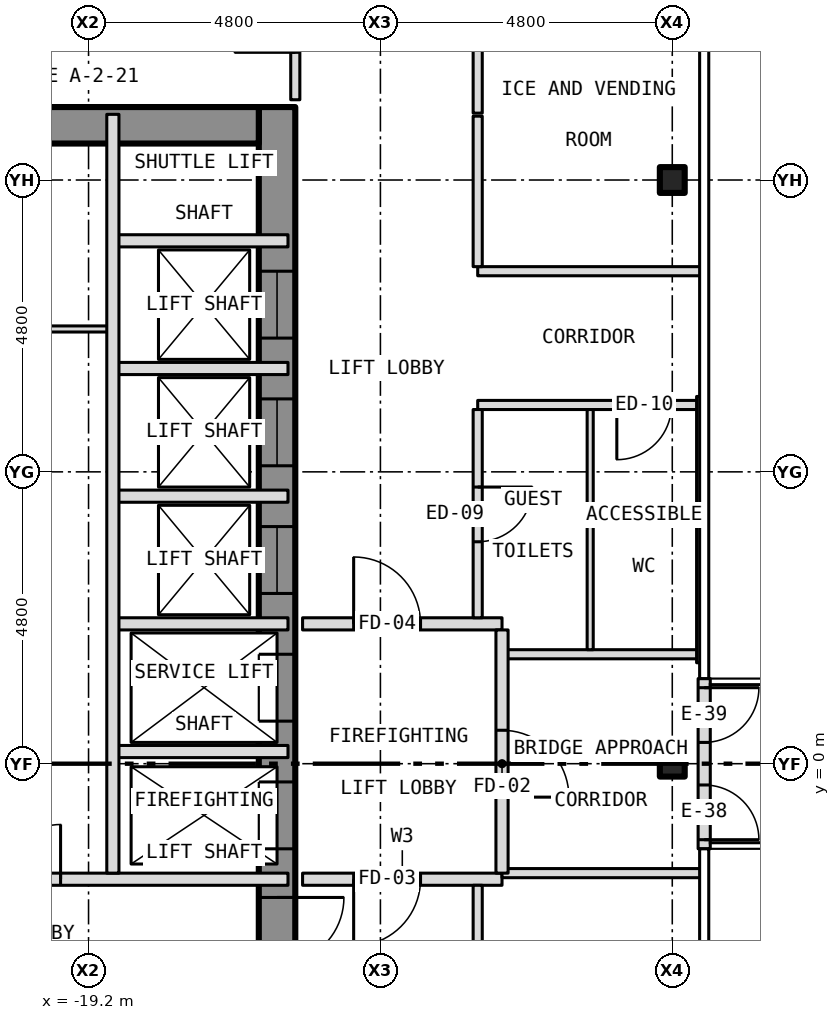
"""IFC4 building model, lengths in metres.
Left out: names, types, materials, properties, quantities, classifications, styles, units other than length and angle.
Written with IfcOpenShell. Run it as: python <this file> out.ifc"""

import sys

from ifc_helpers import new_model, si_unit, direction, frame, frame_2d, origin, origin_2d, place, context, subcontext, project, spatial, rectangle, i_section, extrude, element, fill, save


model = new_model("IFC4")
c1 = context("Model", 3, precision=1e-05, world=origin(), true_north=direction((0.0, 1.0)))
c2 = subcontext(c1, "Body", "Model", "MODEL_VIEW")
j1 = project(units=[si_unit("LENGTHUNIT", "METRE"), si_unit("PLANEANGLEUNIT", "RADIAN")], contexts=[c1])
p1 = place(None, origin())
s1 = spatial("IfcSite", under=j1, at=p1, CompositionType="ELEMENT")
p2 = place(p1, origin())
s2 = spatial("IfcBuilding", under=s1, at=p2, CompositionType="ELEMENT")
p3 = place(p2, frame((0.0, 0.0, 77.5)))
s3 = spatial("IfcBuildingStorey", under=s2, at=p3, CompositionType="ELEMENT", Elevation=77.5)
for number, where, z_axis, x_axis in (
    (1, (-9.6, 0.0, -0.15), (0.0, 0.0, 1.0), (1.0, 0.0, 0.0)),
    (2, (-9.6, 9.6, -0.15), (0.0, 0.0, 1.0), (1.0, 0.0, 0.0)),
):
    element("IfcColumn", number, at=place(p3, frame(where, z_axis=z_axis, x_axis=x_axis)), inside=s3, PredefinedType="COLUMN", context=c2, shape_type="SweptSolid", body=[
        extrude(i_section(OverallWidth=0.409, OverallDepth=0.424, WebThickness=0.033, FlangeThickness=0.052, at=origin_2d()), origin(), (0.0, 0.0, 1.0), 3.5),
    ])
p4 = place(p3, frame((-16.1, -10.8, 0.0), z_axis=(0.0, 0.0, 1.0), x_axis=(0.0, 1.0, 0.0)))
e3 = element("IfcWall", 3, at=p4, inside=s3, PredefinedType="SHEAR", context=c2, shape_type="SweptSolid", body=[
    extrude(rectangle(XDim=21.6, YDim=0.6, at=frame_2d((10.8, 0.0))), origin(), (0.0, 0.0, 1.0), 3.25),
])
p5 = place(p4, frame((9.4, 0.0, 0.0)))
e4 = element("IfcOpeningElement", 4, at=p5, cuts=e3, PredefinedType="OPENING", context=c2, shape_type="SweptSolid", body=[
    extrude(rectangle(XDim=1.1, YDim=2.1, at=frame_2d((0.55, 1.05))), frame((0.0, 0.312, 0.0), z_axis=(0.0, -1.0, 0.0), x_axis=(1.0, 0.0, 0.0)), (0.0, 0.0, 1.0), 0.624),
])
p6 = place(p4, frame((11.5, 0.0, 0.0)))
e5 = element("IfcOpeningElement", 5, at=p6, cuts=e3, PredefinedType="OPENING", context=c2, shape_type="SweptSolid", body=[
    extrude(rectangle(XDim=1.1, YDim=2.1, at=frame_2d((0.55, 1.05))), frame((0.0, 0.312, 0.0), z_axis=(0.0, -1.0, 0.0), x_axis=(1.0, 0.0, 0.0)), (0.0, 0.0, 1.0), 0.624),
])
p7 = place(p4, frame((13.6, 0.0, 0.0)))
e6 = element("IfcOpeningElement", 6, at=p7, cuts=e3, PredefinedType="OPENING", context=c2, shape_type="SweptSolid", body=[
    extrude(rectangle(XDim=1.1, YDim=2.1, at=frame_2d((0.55, 1.05))), frame((0.0, 0.312, 0.0), z_axis=(0.0, -1.0, 0.0), x_axis=(1.0, 0.0, 0.0)), (0.0, 0.0, 1.0), 0.624),
])
p8 = place(p4, frame((15.7, 0.0, 0.0)))
e7 = element("IfcOpeningElement", 7, at=p8, cuts=e3, PredefinedType="OPENING", context=c2, shape_type="SweptSolid", body=[
    extrude(rectangle(XDim=1.1, YDim=2.1, at=frame_2d((0.55, 1.05))), frame((0.0, 0.312, 0.0), z_axis=(0.0, -1.0, 0.0), x_axis=(1.0, 0.0, 0.0)), (0.0, 0.0, 1.0), 0.624),
])
p9 = place(p4, frame((17.8, 0.0, 0.0)))
e8 = element("IfcOpeningElement", 8, at=p9, cuts=e3, PredefinedType="OPENING", context=c2, shape_type="SweptSolid", body=[
    extrude(rectangle(XDim=1.1, YDim=2.1, at=frame_2d((0.55, 1.05))), frame((0.0, 0.312, 0.0), z_axis=(0.0, -1.0, 0.0), x_axis=(1.0, 0.0, 0.0)), (0.0, 0.0, 1.0), 0.624),
])
p10 = place(p4, frame((0.758, 0.0, 0.0)))
e9 = element("IfcOpeningElement", 9, at=p10, cuts=e3, PredefinedType="OPENING", context=c2, shape_type="SweptSolid", body=[
    extrude(rectangle(XDim=1.1, YDim=2.1, at=frame_2d((0.55, 1.05))), frame((0.0, 0.312, 0.0), z_axis=(0.0, -1.0, 0.0), x_axis=(1.0, 0.0, 0.0)), (0.0, 0.0, 1.0), 0.624),
])
p11 = place(p4, frame((7.5, 0.0, 0.0)))
e10 = element("IfcOpeningElement", 10, at=p11, cuts=e3, PredefinedType="OPENING", context=c2, shape_type="SweptSolid", body=[
    extrude(rectangle(XDim=1.1, YDim=2.1, at=frame_2d((0.55, 1.05))), frame((0.0, 0.312, 0.0), z_axis=(0.0, -1.0, 0.0), x_axis=(1.0, 0.0, 0.0)), (0.0, 0.0, 1.0), 0.624),
])
p12 = place(p3, frame((-23.4, 10.5, 0.0), z_axis=(0.0, 0.0, 1.0), x_axis=(1.0, 0.0, 0.0)))
e11 = element("IfcWall", 11, at=p12, inside=s3, PredefinedType="SHEAR", context=c2, shape_type="SweptSolid", body=[
    extrude(rectangle(XDim=7.0, YDim=0.6, at=frame_2d((3.5, 0.0))), origin(), (0.0, 0.0, 1.0), 3.25),
])
p13 = place(p3, frame((-9.075, -1.4, 0.0), z_axis=(0.0, 0.0, 1.0), x_axis=(0.0, 1.0, 0.0)))
e12 = element("IfcWall", 12, at=p13, inside=s3, PredefinedType="SOLIDWALL", context=c2, shape_type="SweptSolid", body=[
    extrude(rectangle(XDim=2.8, YDim=0.2, at=frame_2d((1.4, 0.0))), origin(), (0.0, 0.0, 1.0), 3.5),
])
p14 = place(p13, frame((0.15, 0.0, 0.0)))
e13 = element("IfcOpeningElement", 13, at=p14, cuts=e12, PredefinedType="OPENING", context=c2, shape_type="SweptSolid", body=[
    extrude(rectangle(XDim=0.9, YDim=2.1, at=frame_2d((0.45, 1.05))), frame((0.0, 0.112, 0.0), z_axis=(0.0, -1.0, 0.0), x_axis=(1.0, 0.0, 0.0)), (0.0, 0.0, 1.0), 0.224),
])
p15 = place(p13, frame((1.75, 0.0, 0.0)))
e14 = element("IfcOpeningElement", 14, at=p15, cuts=e12, PredefinedType="OPENING", context=c2, shape_type="SweptSolid", body=[
    extrude(rectangle(XDim=0.9, YDim=2.1, at=frame_2d((0.45, 1.05))), frame((0.0, 0.112, 0.0), z_axis=(0.0, -1.0, 0.0), x_axis=(1.0, 0.0, 0.0)), (0.0, 0.0, 1.0), 0.224),
])
p16 = place(p3, frame((-23.88, -1.9, 0.0), z_axis=(0.0, 0.0, 1.0), x_axis=(1.0, 0.0, 0.0)))
e15 = element("IfcWall", 15, at=p16, inside=s3, PredefinedType="PARTITIONING", context=c2, shape_type="SweptSolid", body=[
    extrude(rectangle(XDim=7.96, YDim=0.2, at=frame_2d((3.98, 0.0))), origin(), (0.0, 0.0, 1.0), 3.25),
])
p17 = place(p16, frame((3.32, 0.0, 0.0)))
e16 = element("IfcOpeningElement", 16, at=p17, cuts=e15, PredefinedType="OPENING", context=c2, shape_type="SweptSolid", body=[
    extrude(rectangle(XDim=0.9, YDim=2.1, at=frame_2d((0.45, 1.05))), frame((0.0, 0.112, 0.0), z_axis=(0.0, -1.0, 0.0), x_axis=(1.0, 0.0, 0.0)), (0.0, 0.0, 1.0), 0.224),
])
p18 = place(p3, frame((-15.68, -1.9, 0.0), z_axis=(0.0, 0.0, 1.0), x_axis=(1.0, 0.0, 0.0)))
e17 = element("IfcWall", 17, at=p18, inside=s3, PredefinedType="PARTITIONING", context=c2, shape_type="SweptSolid", body=[
    extrude(rectangle(XDim=3.28, YDim=0.2, at=frame_2d((1.64, 0.0))), origin(), (0.0, 0.0, 1.0), 3.35),
])
p19 = place(p18, frame((0.84, 0.0, 0.0)))
e18 = element("IfcOpeningElement", 18, at=p19, cuts=e17, PredefinedType="OPENING", context=c2, shape_type="SweptSolid", body=[
    extrude(rectangle(XDim=1.1, YDim=2.1, at=frame_2d((0.55, 1.05))), frame((0.0, 0.112, 0.0), z_axis=(0.0, -1.0, 0.0), x_axis=(1.0, 0.0, 0.0)), (0.0, 0.0, 1.0), 0.224),
])
p20 = place(p3, frame((-12.4, -1.8, 0.0), z_axis=(0.0, 0.0, 1.0), x_axis=(1.0, 0.0, 0.0)))
e19 = element("IfcWall", 19, at=p20, inside=s3, PredefinedType="PARTITIONING", context=c2, shape_type="SweptSolid", body=[
    extrude(rectangle(XDim=3.28, YDim=0.15, at=frame_2d((1.64, 0.0))), origin(), (0.0, 0.0, 1.0), 3.35),
])
p21 = place(p3, frame((-18.8, 0.2, 0.0), z_axis=(0.0, 0.0, 1.0), x_axis=(1.0, 0.0, 0.0)))
e20 = element("IfcWall", 20, at=p21, inside=s3, PredefinedType="PARTITIONING", context=c2, shape_type="SweptSolid", body=[
    extrude(rectangle(XDim=2.88, YDim=0.2, at=frame_2d((1.44, 0.0))), origin(), (0.0, 0.0, 1.0), 3.25),
])
p22 = place(p3, frame((-12.4, 1.8, 0.0), z_axis=(0.0, 0.0, 1.0), x_axis=(1.0, 0.0, 0.0)))
e21 = element("IfcWall", 21, at=p22, inside=s3, PredefinedType="PARTITIONING", context=c2, shape_type="SweptSolid", body=[
    extrude(rectangle(XDim=3.25, YDim=0.15, at=frame_2d((1.625, 0.0))), origin(), (0.0, 0.0, 1.0), 3.35),
])
p23 = place(p3, frame((-18.8, 2.3, 0.0), z_axis=(0.0, 0.0, 1.0), x_axis=(1.0, 0.0, 0.0)))
e22 = element("IfcWall", 22, at=p23, inside=s3, PredefinedType="PARTITIONING", context=c2, shape_type="SweptSolid", body=[
    extrude(rectangle(XDim=2.88, YDim=0.2, at=frame_2d((1.44, 0.0))), origin(), (0.0, 0.0, 1.0), 3.25),
])
p24 = place(p3, frame((-15.68, 2.3, 0.0), z_axis=(0.0, 0.0, 1.0), x_axis=(1.0, 0.0, 0.0)))
e23 = element("IfcWall", 23, at=p24, inside=s3, PredefinedType="PARTITIONING", context=c2, shape_type="SweptSolid", body=[
    extrude(rectangle(XDim=3.28, YDim=0.2, at=frame_2d((1.64, 0.0))), origin(), (0.0, 0.0, 1.0), 3.35),
])
p25 = place(p24, frame((0.84, 0.0, 0.0)))
e24 = element("IfcOpeningElement", 24, at=p25, cuts=e23, PredefinedType="OPENING", context=c2, shape_type="SweptSolid", body=[
    extrude(rectangle(XDim=1.1, YDim=2.1, at=frame_2d((0.55, 1.05))), frame((0.0, 0.112, 0.0), z_axis=(0.0, -1.0, 0.0), x_axis=(1.0, 0.0, 0.0)), (0.0, 0.0, 1.0), 0.224),
])
p26 = place(p3, frame((-18.8, 4.4, 0.0), z_axis=(0.0, 0.0, 1.0), x_axis=(1.0, 0.0, 0.0)))
e25 = element("IfcWall", 25, at=p26, inside=s3, PredefinedType="PARTITIONING", context=c2, shape_type="SweptSolid", body=[
    extrude(rectangle(XDim=2.88, YDim=0.2, at=frame_2d((1.44, 0.0))), origin(), (0.0, 0.0, 1.0), 3.25),
])
p27 = place(p3, frame((-12.8, 5.9, 0.0), z_axis=(0.0, 0.0, 1.0), x_axis=(1.0, 0.0, 0.0)))
e26 = element("IfcWall", 26, at=p27, inside=s3, PredefinedType="PARTITIONING", context=c2, shape_type="SweptSolid", body=[
    extrude(rectangle(XDim=3.65, YDim=0.15, at=frame_2d((1.825, 0.0))), origin(), (0.0, 0.0, 1.0), 3.35),
])
p28 = place(p27, frame((2.288, 0.0, 0.0)))
e27 = element("IfcOpeningElement", 27, at=p28, cuts=e26, PredefinedType="OPENING", context=c2, shape_type="SweptSolid", body=[
    extrude(rectangle(XDim=0.9, YDim=2.1, at=frame_2d((0.45, 1.05))), frame((0.0, 0.087, 0.0), z_axis=(0.0, -1.0, 0.0), x_axis=(1.0, 0.0, 0.0)), (0.0, 0.0, 1.0), 0.174),
])
p29 = place(p3, frame((-18.8, 6.5, 0.0), z_axis=(0.0, 0.0, 1.0), x_axis=(1.0, 0.0, 0.0)))
e28 = element("IfcWall", 28, at=p29, inside=s3, PredefinedType="PARTITIONING", context=c2, shape_type="SweptSolid", body=[
    extrude(rectangle(XDim=2.88, YDim=0.2, at=frame_2d((1.44, 0.0))), origin(), (0.0, 0.0, 1.0), 3.25),
])
p30 = place(p3, frame((-23.88, 7.15, 0.0), z_axis=(0.0, 0.0, 1.0), x_axis=(1.0, 0.0, 0.0)))
e29 = element("IfcWall", 29, at=p30, inside=s3, PredefinedType="PARTITIONING", context=c2, shape_type="SweptSolid", body=[
    extrude(rectangle(XDim=5.08, YDim=0.1, at=frame_2d((2.54, 0.0))), origin(), (0.0, 0.0, 1.0), 3.25),
])
p31 = place(p30, frame((2.03, 0.0, 0.0)))
e30 = element("IfcOpeningElement", 30, at=p31, cuts=e29, PredefinedType="OPENING", context=c2, shape_type="SweptSolid", body=[
    extrude(rectangle(XDim=0.9, YDim=2.1, at=frame_2d((0.45, 1.05))), frame((0.0, 0.062, 0.0), z_axis=(0.0, -1.0, 0.0), x_axis=(1.0, 0.0, 0.0)), (0.0, 0.0, 1.0), 0.124),
])
p32 = place(p3, frame((-12.8, 8.1, 0.0), z_axis=(0.0, 0.0, 1.0), x_axis=(1.0, 0.0, 0.0)))
e31 = element("IfcWall", 31, at=p32, inside=s3, PredefinedType="PARTITIONING", context=c2, shape_type="SweptSolid", body=[
    extrude(rectangle(XDim=3.68, YDim=0.15, at=frame_2d((1.84, 0.0))), origin(), (0.0, 0.0, 1.0), 3.35),
])
p33 = place(p3, frame((-18.8, 8.6, 0.0), z_axis=(0.0, 0.0, 1.0), x_axis=(1.0, 0.0, 0.0)))
e32 = element("IfcWall", 32, at=p33, inside=s3, PredefinedType="PARTITIONING", context=c2, shape_type="SweptSolid", body=[
    extrude(rectangle(XDim=2.88, YDim=0.2, at=frame_2d((1.44, 0.0))), origin(), (0.0, 0.0, 1.0), 3.25),
])
p34 = place(p3, frame((-18.8, -1.8, 0.0), z_axis=(0.0, 0.0, 1.0), x_axis=(0.0, 1.0, 0.0)))
e33 = element("IfcWall", 33, at=p34, inside=s3, PredefinedType="PARTITIONING", context=c2, shape_type="SweptSolid", body=[
    extrude(rectangle(XDim=12.48, YDim=0.2, at=frame_2d((6.24, 0.0))), origin(), (0.0, 0.0, 1.0), 3.25),
])
p35 = place(p3, frame((-15.8, 10.92, 0.0), z_axis=(0.0, 0.0, 1.0), x_axis=(0.0, 1.0, 0.0)))
e34 = element("IfcWall", 34, at=p35, inside=s3, PredefinedType="PARTITIONING", context=c2, shape_type="SweptSolid", body=[
    extrude(rectangle(XDim=4.805, YDim=0.15, at=frame_2d((2.403, 0.0))), origin(), (0.0, 0.0, 1.0), 3.35),
])
p36 = place(p35, frame((0.78, 0.0, 0.0)))
e35 = element("IfcOpeningElement", 35, at=p36, cuts=e34, PredefinedType="OPENING", context=c2, shape_type="SweptSolid", body=[
    extrude(rectangle(XDim=1.0, YDim=2.1, at=frame_2d((0.5, 1.05))), frame((0.0, 0.087, 0.0), z_axis=(0.0, -1.0, 0.0), x_axis=(1.0, 0.0, 0.0)), (0.0, 0.0, 1.0), 0.174),
])
p37 = place(p3, frame((-12.8, -13.525, 0.0), z_axis=(0.0, 0.0, 1.0), x_axis=(0.0, 1.0, 0.0)))
e36 = element("IfcWall", 36, at=p37, inside=s3, PredefinedType="PARTITIONING", context=c2, shape_type="SweptSolid", body=[
    extrude(rectangle(XDim=11.525, YDim=0.15, at=frame_2d((5.762, 0.0))), origin(), (0.0, 0.0, 1.0), 3.35),
])
p38 = place(p37, frame((6.725, 0.0, 0.0)))
e37 = element("IfcOpeningElement", 37, at=p38, cuts=e36, PredefinedType="OPENING", context=c2, shape_type="SweptSolid", body=[
    extrude(rectangle(XDim=0.9, YDim=2.1, at=frame_2d((0.45, 1.05))), frame((0.0, 0.087, 0.0), z_axis=(0.0, -1.0, 0.0), x_axis=(1.0, 0.0, 0.0)), (0.0, 0.0, 1.0), 0.174),
])
p39 = place(p3, frame((-12.8, 2.4, 0.0), z_axis=(0.0, 0.0, 1.0), x_axis=(0.0, 1.0, 0.0)))
e38 = element("IfcWall", 38, at=p39, inside=s3, PredefinedType="PARTITIONING", context=c2, shape_type="SweptSolid", body=[
    extrude(rectangle(XDim=3.425, YDim=0.15, at=frame_2d((1.712, 0.0))), origin(), (0.0, 0.0, 1.0), 3.35),
])
p40 = place(p39, frame((1.25, 0.0, 0.0)))
e39 = element("IfcOpeningElement", 39, at=p40, cuts=e38, PredefinedType="OPENING", context=c2, shape_type="SweptSolid", body=[
    extrude(rectangle(XDim=0.9, YDim=2.1, at=frame_2d((0.45, 1.05))), frame((0.0, 0.087, 0.0), z_axis=(0.0, -1.0, 0.0), x_axis=(1.0, 0.0, 0.0)), (0.0, 0.0, 1.0), 0.174),
])
p41 = place(p3, frame((-12.8, 8.175, 0.0), z_axis=(0.0, 0.0, 1.0), x_axis=(0.0, 1.0, 0.0)))
e40 = element("IfcWall", 40, at=p41, inside=s3, PredefinedType="PARTITIONING", context=c2, shape_type="SweptSolid", body=[
    extrude(rectangle(XDim=2.475, YDim=0.15, at=frame_2d((1.237, 0.0))), origin(), (0.0, 0.0, 1.0), 3.35),
])
p42 = place(p3, frame((-12.8, 10.7, 0.0), z_axis=(0.0, 0.0, 1.0), x_axis=(0.0, 1.0, 0.0)))
e41 = element("IfcWall", 41, at=p42, inside=s3, PredefinedType="PARTITIONING", context=c2, shape_type="SweptSolid", body=[
    extrude(rectangle(XDim=2.825, YDim=0.15, at=frame_2d((1.413, 0.0))), origin(), (0.0, 0.0, 1.0), 3.35),
])
p43 = place(p3, frame((-12.4, -1.8, 0.0), z_axis=(0.0, 0.0, 1.0), x_axis=(0.0, 1.0, 0.0)))
e42 = element("IfcWall", 42, at=p43, inside=s3, PredefinedType="PARTITIONING", context=c2, shape_type="SweptSolid", body=[
    extrude(rectangle(XDim=4.0, YDim=0.2, at=frame_2d((2.0, 0.0))), origin(), (0.0, 0.0, 1.0), 3.35),
])
p44 = place(p43, frame((1.25, 0.0, 0.0)))
e43 = element("IfcOpeningElement", 43, at=p44, cuts=e42, PredefinedType="OPENING", context=c2, shape_type="SweptSolid", body=[
    extrude(rectangle(XDim=1.1, YDim=2.1, at=frame_2d((0.55, 1.05))), frame((0.0, 0.112, 0.0), z_axis=(0.0, -1.0, 0.0), x_axis=(1.0, 0.0, 0.0)), (0.0, 0.0, 1.0), 0.224),
])
p45 = place(p3, frame((-10.95, 1.875, 0.0), z_axis=(0.0, 0.0, 1.0), x_axis=(0.0, 1.0, 0.0)))
e44 = element("IfcWall", 44, at=p45, inside=s3, PredefinedType="PARTITIONING", context=c2, shape_type="SweptSolid", body=[
    extrude(rectangle(XDim=3.95, YDim=0.1, at=frame_2d((1.975, 0.0))), origin(), (0.0, 0.0, 1.0), 3.35),
])
p46 = place(p3, frame((-9.15, 1.66, 0.0), z_axis=(0.0, 0.0, 1.0), x_axis=(0.0, 1.0, 0.0)))
e45 = element("IfcWall", 45, at=p46, inside=s3, PredefinedType="PARTITIONING", context=c2, shape_type="SweptSolid", body=[
    extrude(rectangle(XDim=4.38, YDim=0.1, at=frame_2d((2.19, 0.0))), origin(), (0.0, 0.0, 1.0), 2.733),
])
p47 = place(p14, origin())
e46 = element("IfcDoor", 46, at=p47, inside=s3, OperationType="SINGLE_SWING_LEFT", PredefinedType="DOOR", context=c2, shape_type="SweptSolid", body=[
    extrude(rectangle(XDim=0.9, YDim=2.1, at=frame_2d((0.45, 1.05))), frame((0.0, 0.025, 0.0), z_axis=(0.0, -1.0, 0.0), x_axis=(1.0, 0.0, 0.0)), (0.0, 0.0, 1.0), 0.05),
])
fill(e13, e46)
p48 = place(p15, origin())
e47 = element("IfcDoor", 47, at=p48, inside=s3, OperationType="SINGLE_SWING_RIGHT", PredefinedType="DOOR", context=c2, shape_type="SweptSolid", body=[
    extrude(rectangle(XDim=0.9, YDim=2.1, at=frame_2d((0.45, 1.05))), frame((0.0, 0.025, 0.0), z_axis=(0.0, -1.0, 0.0), x_axis=(1.0, 0.0, 0.0)), (0.0, 0.0, 1.0), 0.05),
])
fill(e14, e47)
p49 = place(p5, origin())
e48 = element("IfcDoor", 48, at=p49, inside=s3, OperationType="SLIDING_TO_LEFT", PredefinedType="DOOR", context=c2, shape_type="SweptSolid", body=[
    extrude(rectangle(XDim=1.1, YDim=2.1, at=frame_2d((0.55, 1.05))), frame((0.0, 0.025, 0.0), z_axis=(0.0, -1.0, 0.0), x_axis=(1.0, 0.0, 0.0)), (0.0, 0.0, 1.0), 0.05),
])
fill(e4, e48)
p50 = place(p6, origin())
e49 = element("IfcDoor", 49, at=p50, inside=s3, OperationType="SLIDING_TO_LEFT", PredefinedType="DOOR", context=c2, shape_type="SweptSolid", body=[
    extrude(rectangle(XDim=1.1, YDim=2.1, at=frame_2d((0.55, 1.05))), frame((0.0, 0.025, 0.0), z_axis=(0.0, -1.0, 0.0), x_axis=(1.0, 0.0, 0.0)), (0.0, 0.0, 1.0), 0.05),
])
fill(e5, e49)
p51 = place(p7, origin())
e50 = element("IfcDoor", 50, at=p51, inside=s3, OperationType="SLIDING_TO_LEFT", PredefinedType="DOOR", context=c2, shape_type="SweptSolid", body=[
    extrude(rectangle(XDim=1.1, YDim=2.1, at=frame_2d((0.55, 1.05))), frame((0.0, 0.025, 0.0), z_axis=(0.0, -1.0, 0.0), x_axis=(1.0, 0.0, 0.0)), (0.0, 0.0, 1.0), 0.05),
])
fill(e6, e50)
p52 = place(p8, origin())
e51 = element("IfcDoor", 51, at=p52, inside=s3, OperationType="SLIDING_TO_LEFT", PredefinedType="DOOR", context=c2, shape_type="SweptSolid", body=[
    extrude(rectangle(XDim=1.1, YDim=2.1, at=frame_2d((0.55, 1.05))), frame((0.0, 0.025, 0.0), z_axis=(0.0, -1.0, 0.0), x_axis=(1.0, 0.0, 0.0)), (0.0, 0.0, 1.0), 0.05),
])
fill(e7, e51)
p53 = place(p9, origin())
e52 = element("IfcDoor", 52, at=p53, inside=s3, OperationType="SLIDING_TO_LEFT", PredefinedType="DOOR", context=c2, shape_type="SweptSolid", body=[
    extrude(rectangle(XDim=1.1, YDim=2.1, at=frame_2d((0.55, 1.05))), frame((0.0, 0.025, 0.0), z_axis=(0.0, -1.0, 0.0), x_axis=(1.0, 0.0, 0.0)), (0.0, 0.0, 1.0), 0.05),
])
fill(e8, e52)
p54 = place(p11, origin())
e53 = element("IfcDoor", 53, at=p54, inside=s3, OperationType="SINGLE_SWING_RIGHT", PredefinedType="DOOR", context=c2, shape_type="SweptSolid", body=[
    extrude(rectangle(XDim=1.1, YDim=2.1, at=frame_2d((0.55, 1.05))), frame((0.0, 0.025, 0.0), z_axis=(0.0, -1.0, 0.0), x_axis=(1.0, 0.0, 0.0)), (0.0, 0.0, 1.0), 0.05),
])
fill(e10, e53)
p55 = place(p17, origin())
e54 = element("IfcDoor", 54, at=p55, inside=s3, OperationType="SINGLE_SWING_RIGHT", PredefinedType="DOOR", context=c2, shape_type="SweptSolid", body=[
    extrude(rectangle(XDim=0.9, YDim=2.1, at=frame_2d((0.45, 1.05))), frame((0.0, 0.025, 0.0), z_axis=(0.0, -1.0, 0.0), x_axis=(1.0, 0.0, 0.0)), (0.0, 0.0, 1.0), 0.05),
])
fill(e16, e54)
p56 = place(p44, origin())
e55 = element("IfcDoor", 55, at=p56, inside=s3, OperationType="SINGLE_SWING_LEFT", PredefinedType="DOOR", context=c2, shape_type="SweptSolid", body=[
    extrude(rectangle(XDim=1.1, YDim=2.1, at=frame_2d((0.55, 1.05))), frame((0.0, 0.025, 0.0), z_axis=(0.0, -1.0, 0.0), x_axis=(1.0, 0.0, 0.0)), (0.0, 0.0, 1.0), 0.05),
])
fill(e43, e55)
p57 = place(p19, origin())
e56 = element("IfcDoor", 56, at=p57, inside=s3, OperationType="SINGLE_SWING_LEFT", PredefinedType="DOOR", context=c2, shape_type="SweptSolid", body=[
    extrude(rectangle(XDim=1.1, YDim=2.1, at=frame_2d((0.55, 1.05))), frame((0.0, 0.025, 0.0), z_axis=(0.0, -1.0, 0.0), x_axis=(1.0, 0.0, 0.0)), (0.0, 0.0, 1.0), 0.05),
])
fill(e18, e56)
p58 = place(p25, origin())
e57 = element("IfcDoor", 57, at=p58, inside=s3, OperationType="SINGLE_SWING_LEFT", PredefinedType="DOOR", context=c2, shape_type="SweptSolid", body=[
    extrude(rectangle(XDim=1.1, YDim=2.1, at=frame_2d((0.55, 1.05))), frame((0.0, 0.025, 0.0), z_axis=(0.0, -1.0, 0.0), x_axis=(1.0, 0.0, 0.0)), (0.0, 0.0, 1.0), 0.05),
])
fill(e24, e57)
p59 = place(p40, origin())
e58 = element("IfcDoor", 58, at=p59, inside=s3, OperationType="SINGLE_SWING_RIGHT", PredefinedType="DOOR", context=c2, shape_type="SweptSolid", body=[
    extrude(rectangle(XDim=0.9, YDim=2.1, at=frame_2d((0.45, 1.05))), frame((0.0, 0.025, 0.0), z_axis=(0.0, -1.0, 0.0), x_axis=(1.0, 0.0, 0.0)), (0.0, 0.0, 1.0), 0.05),
])
fill(e39, e58)
p60 = place(p28, origin())
e59 = element("IfcDoor", 59, at=p60, inside=s3, OperationType="SINGLE_SWING_LEFT", PredefinedType="DOOR", context=c2, shape_type="SweptSolid", body=[
    extrude(rectangle(XDim=0.9, YDim=2.1, at=frame_2d((0.45, 1.05))), frame((0.0, 0.025, 0.0), z_axis=(0.0, -1.0, 0.0), x_axis=(1.0, 0.0, 0.0)), (0.0, 0.0, 1.0), 0.05),
])
fill(e27, e59)
save(model, sys.argv[1])
